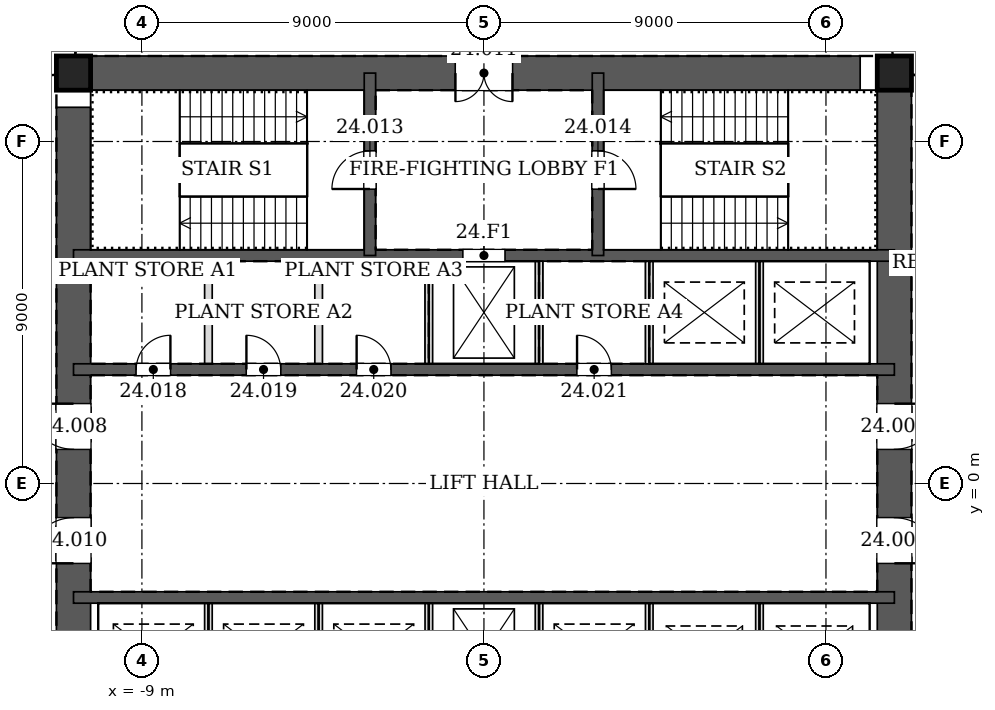
"""IFC4 building model, lengths in metres.
Left out: names, types, materials, properties, quantities, classifications, styles, units other than length and angle.
Written with IfcOpenShell. Run it as: python <this file> out.ifc"""

import sys

from ifc_helpers import new_model, si_unit, direction, frame, frame_2d, origin, origin_2d, place, context, subcontext, project, spatial, rectangle, hollow_rectangle, extrude, element, fill, save


model = new_model("IFC4")
c1 = context("Model", 3, precision=1e-05, world=origin(), true_north=direction((0.0, 1.0)))
c2 = subcontext(c1, "Body", "Model", "MODEL_VIEW")
j1 = project(units=[si_unit("LENGTHUNIT", "METRE"), si_unit("PLANEANGLEUNIT", "RADIAN")], contexts=[c1])
p1 = place(None, origin())
s1 = spatial("IfcSite", under=j1, at=p1, CompositionType="ELEMENT")
p2 = place(p1, origin())
s2 = spatial("IfcBuilding", under=s1, at=p2, CompositionType="ELEMENT")
p3 = place(p2, frame((0.0, 0.0, 108.9)))
s3 = spatial("IfcBuildingStorey", under=s2, at=p3, CompositionType="ELEMENT", Elevation=108.9)
for number, where, z_axis, x_axis in (
    (1, (10.8, 10.8, 0.0), (0.0, 0.0, 1.0), (1.0, 0.0, 0.0)),
    (2, (-10.8, 10.8, 0.0), (0.0, 0.0, 1.0), (1.0, 0.0, 0.0)),
):
    element("IfcColumn", number, at=place(p3, frame(where, z_axis=z_axis, x_axis=x_axis)), inside=s3, PredefinedType="COLUMN", context=c2, shape_type="SweptSolid", body=[
        extrude(hollow_rectangle(XDim=0.9, YDim=0.9, WallThickness=0.06, at=origin_2d()), origin(), (0.0, 0.0, 1.0), 4.5),
    ])
p4 = place(p3, frame((10.8, -10.8, 0.0), z_axis=(0.0, 0.0, 1.0), x_axis=(0.0, 1.0, 0.0)))
e3 = element("IfcWall", 3, at=p4, inside=s3, PredefinedType="SOLIDWALL", context=c2, shape_type="SweptSolid", body=[
    extrude(rectangle(XDim=21.6, YDim=0.9, at=frame_2d((10.8, 0.0))), origin(), (0.0, 0.0, 1.0), 4.5),
])
p5 = place(p4, frame((11.7, 0.0, 0.0)))
e4 = element("IfcOpeningElement", 4, at=p5, cuts=e3, PredefinedType="OPENING", context=c2, shape_type="SweptSolid", body=[
    extrude(rectangle(XDim=1.2, YDim=2.1, at=frame_2d((0.6, 1.05))), frame((0.0, 0.46, 0.0), z_axis=(0.0, -1.0, 0.0), x_axis=(1.0, 0.0, 0.0)), (0.0, 0.0, 1.0), 0.92),
])
p6 = place(p4, frame((8.7, 0.0, 0.0)))
e5 = element("IfcOpeningElement", 5, at=p6, cuts=e3, PredefinedType="OPENING", context=c2, shape_type="SweptSolid", body=[
    extrude(rectangle(XDim=1.2, YDim=2.1, at=frame_2d((0.6, 1.05))), frame((0.0, 0.46, 0.0), z_axis=(0.0, -1.0, 0.0), x_axis=(1.0, 0.0, 0.0)), (0.0, 0.0, 1.0), 0.92),
])
p7 = place(p3, frame((10.8, 10.8, 0.0), z_axis=(0.0, 0.0, 1.0), x_axis=(-1.0, 0.0, 0.0)))
e6 = element("IfcWall", 6, at=p7, inside=s3, PredefinedType="SOLIDWALL", context=c2, shape_type="SweptSolid", body=[
    extrude(rectangle(XDim=21.6, YDim=0.9, at=frame_2d((10.8, 0.0))), origin(), (0.0, 0.0, 1.0), 4.5),
])
p8 = place(p7, frame((10.05, 0.0, 0.0)))
e7 = element("IfcOpeningElement", 7, at=p8, cuts=e6, PredefinedType="OPENING", context=c2, shape_type="SweptSolid", body=[
    extrude(rectangle(XDim=1.5, YDim=2.1, at=frame_2d((0.75, 1.05))), frame((0.0, 0.46, 0.0), z_axis=(0.0, -1.0, 0.0), x_axis=(1.0, 0.0, 0.0)), (0.0, 0.0, 1.0), 0.92),
])
p9 = place(p3, frame((-10.8, 10.8, 0.0), z_axis=(0.0, 0.0, 1.0), x_axis=(0.0, -1.0, 0.0)))
e8 = element("IfcWall", 8, at=p9, inside=s3, PredefinedType="SOLIDWALL", context=c2, shape_type="SweptSolid", body=[
    extrude(rectangle(XDim=21.6, YDim=0.9, at=frame_2d((10.8, 0.0))), origin(), (0.0, 0.0, 1.0), 4.5),
])
p10 = place(p9, frame((8.7, 0.0, 0.0)))
e9 = element("IfcOpeningElement", 9, at=p10, cuts=e8, PredefinedType="OPENING", context=c2, shape_type="SweptSolid", body=[
    extrude(rectangle(XDim=1.2, YDim=2.1, at=frame_2d((0.6, 1.05))), frame((0.0, 0.46, 0.0), z_axis=(0.0, -1.0, 0.0), x_axis=(1.0, 0.0, 0.0)), (0.0, 0.0, 1.0), 0.92),
])
p11 = place(p9, frame((11.7, 0.0, 0.0)))
e10 = element("IfcOpeningElement", 10, at=p11, cuts=e8, PredefinedType="OPENING", context=c2, shape_type="SweptSolid", body=[
    extrude(rectangle(XDim=1.2, YDim=2.1, at=frame_2d((0.6, 1.05))), frame((0.0, 0.46, 0.0), z_axis=(0.0, -1.0, 0.0), x_axis=(1.0, 0.0, 0.0)), (0.0, 0.0, 1.0), 0.92),
])
p12 = place(p3, frame((-10.8, 3.0, 0.0), z_axis=(0.0, 0.0, 1.0), x_axis=(1.0, 0.0, 0.0)))
e11 = element("IfcWall", 11, at=p12, inside=s3, PredefinedType="SOLIDWALL", context=c2, shape_type="SweptSolid", body=[
    extrude(rectangle(XDim=21.6, YDim=0.3, at=frame_2d((10.8, 0.0))), origin(), (0.0, 0.0, 1.0), 4.5),
])
p13 = place(p12, frame((1.65, 0.0, 0.0)))
e12 = element("IfcOpeningElement", 12, at=p13, cuts=e11, PredefinedType="OPENING", context=c2, shape_type="SweptSolid", body=[
    extrude(rectangle(XDim=0.9, YDim=2.1, at=frame_2d((0.45, 1.05))), frame((0.0, 0.16, 0.0), z_axis=(0.0, -1.0, 0.0), x_axis=(1.0, 0.0, 0.0)), (0.0, 0.0, 1.0), 0.32),
])
p14 = place(p12, frame((4.55, 0.0, 0.0)))
e13 = element("IfcOpeningElement", 13, at=p14, cuts=e11, PredefinedType="OPENING", context=c2, shape_type="SweptSolid", body=[
    extrude(rectangle(XDim=0.9, YDim=2.1, at=frame_2d((0.45, 1.05))), frame((0.0, 0.16, 0.0), z_axis=(0.0, -1.0, 0.0), x_axis=(1.0, 0.0, 0.0)), (0.0, 0.0, 1.0), 0.32),
])
p15 = place(p12, frame((7.45, 0.0, 0.0)))
e14 = element("IfcOpeningElement", 14, at=p15, cuts=e11, PredefinedType="OPENING", context=c2, shape_type="SweptSolid", body=[
    extrude(rectangle(XDim=0.9, YDim=2.1, at=frame_2d((0.45, 1.05))), frame((0.0, 0.16, 0.0), z_axis=(0.0, -1.0, 0.0), x_axis=(1.0, 0.0, 0.0)), (0.0, 0.0, 1.0), 0.32),
])
p16 = place(p12, frame((13.25, 0.0, 0.0)))
e15 = element("IfcOpeningElement", 15, at=p16, cuts=e11, PredefinedType="OPENING", context=c2, shape_type="SweptSolid", body=[
    extrude(rectangle(XDim=0.9, YDim=2.1, at=frame_2d((0.45, 1.05))), frame((0.0, 0.16, 0.0), z_axis=(0.0, -1.0, 0.0), x_axis=(1.0, 0.0, 0.0)), (0.0, 0.0, 1.0), 0.32),
])
p17 = place(p3, frame((-10.8, 6.0, 0.0), z_axis=(0.0, 0.0, 1.0), x_axis=(1.0, 0.0, 0.0)))
e16 = element("IfcWall", 16, at=p17, inside=s3, PredefinedType="SOLIDWALL", context=c2, shape_type="SweptSolid", body=[
    extrude(rectangle(XDim=21.6, YDim=0.3, at=frame_2d((10.8, 0.0))), origin(), (0.0, 0.0, 1.0), 4.5),
])
p18 = place(p17, frame((10.25, 0.0, 0.0)))
e17 = element("IfcOpeningElement", 17, at=p18, cuts=e16, PredefinedType="OPENING", context=c2, shape_type="SweptSolid", body=[
    extrude(rectangle(XDim=1.1, YDim=2.1, at=frame_2d((0.55, 1.05))), frame((0.0, 0.16, 0.0), z_axis=(0.0, -1.0, 0.0), x_axis=(1.0, 0.0, 0.0)), (0.0, 0.0, 1.0), 0.32),
])
p19 = place(p3, frame((-3.0, 6.0, 0.0), z_axis=(0.0, 0.0, 1.0), x_axis=(0.0, 1.0, 0.0)))
e18 = element("IfcWall", 18, at=p19, inside=s3, PredefinedType="SOLIDWALL", context=c2, shape_type="SweptSolid", body=[
    extrude(rectangle(XDim=4.8, YDim=0.3, at=frame_2d((2.4, 0.0))), origin(), (0.0, 0.0, 1.0), 4.5),
])
p20 = place(p19, frame((1.75, 0.0, 0.0)))
e19 = element("IfcOpeningElement", 19, at=p20, cuts=e18, PredefinedType="OPENING", context=c2, shape_type="SweptSolid", body=[
    extrude(rectangle(XDim=1.0, YDim=2.1, at=frame_2d((0.5, 1.05))), frame((0.0, 0.16, 0.0), z_axis=(0.0, -1.0, 0.0), x_axis=(1.0, 0.0, 0.0)), (0.0, 0.0, 1.0), 0.32),
])
p21 = place(p3, frame((3.0, 6.0, 0.0), z_axis=(0.0, 0.0, 1.0), x_axis=(0.0, 1.0, 0.0)))
e20 = element("IfcWall", 20, at=p21, inside=s3, PredefinedType="SOLIDWALL", context=c2, shape_type="SweptSolid", body=[
    extrude(rectangle(XDim=4.8, YDim=0.3, at=frame_2d((2.4, 0.0))), origin(), (0.0, 0.0, 1.0), 4.5),
])
p22 = place(p21, frame((1.75, 0.0, 0.0)))
e21 = element("IfcOpeningElement", 21, at=p22, cuts=e20, PredefinedType="OPENING", context=c2, shape_type="SweptSolid", body=[
    extrude(rectangle(XDim=1.0, YDim=2.1, at=frame_2d((0.5, 1.05))), frame((0.0, 0.16, 0.0), z_axis=(0.0, -1.0, 0.0), x_axis=(1.0, 0.0, 0.0)), (0.0, 0.0, 1.0), 0.32),
])
p23 = place(p3, frame((-10.8, -3.0, 0.0), z_axis=(0.0, 0.0, 1.0), x_axis=(1.0, 0.0, 0.0)))
e22 = element("IfcWall", 22, at=p23, inside=s3, PredefinedType="SOLIDWALL", context=c2, shape_type="SweptSolid", body=[
    extrude(rectangle(XDim=21.6, YDim=0.3, at=frame_2d((10.8, 0.0))), origin(), (0.0, 0.0, 1.0), 4.5),
])
for number, where, z_axis, x_axis in (
    (23, (-7.25, 3.15, 0.0), (0.0, 0.0, 1.0), (0.0, 1.0, 0.0)),
    (24, (-4.35, 3.15, 0.0), (0.0, 0.0, 1.0), (0.0, 1.0, 0.0)),
    (25, (-1.45, 3.15, 0.0), (0.0, 0.0, 1.0), (0.0, 1.0, 0.0)),
    (26, (1.45, 3.15, 0.0), (0.0, 0.0, 1.0), (0.0, 1.0, 0.0)),
    (27, (4.35, 3.15, 0.0), (0.0, 0.0, 1.0), (0.0, 1.0, 0.0)),
):
    element("IfcWall", number, at=place(p3, frame(where, z_axis=z_axis, x_axis=x_axis)), inside=s3, PredefinedType="PARTITIONING", context=c2, shape_type="SweptSolid", body=[
        extrude(rectangle(XDim=2.7, YDim=0.2, at=frame_2d((1.35, 0.0))), origin(), (0.0, 0.0, 1.0), 4.335),
    ])
for number, where, z_axis, x_axis in (
    (28, (7.25, 3.15, 0.0), (0.0, 0.0, 1.0), (0.0, 1.0, 0.0)),
    (29, (-7.25, -5.85, 0.0), (0.0, 0.0, 1.0), (0.0, 1.0, 0.0)),
    (30, (-4.35, -5.85, 0.0), (0.0, 0.0, 1.0), (0.0, 1.0, 0.0)),
    (31, (-1.45, -5.85, 0.0), (0.0, 0.0, 1.0), (0.0, 1.0, 0.0)),
    (32, (1.45, -5.85, 0.0), (0.0, 0.0, 1.0), (0.0, 1.0, 0.0)),
    (33, (4.35, -5.85, 0.0), (0.0, 0.0, 1.0), (0.0, 1.0, 0.0)),
    (34, (7.25, -5.85, 0.0), (0.0, 0.0, 1.0), (0.0, 1.0, 0.0)),
):
    element("IfcWall", number, at=place(p3, frame(where, z_axis=z_axis, x_axis=x_axis)), inside=s3, PredefinedType="PARTITIONING", context=c2, shape_type="SweptSolid", body=[
        extrude(rectangle(XDim=2.7, YDim=0.2, at=frame_2d((1.35, 0.0))), origin(), (0.0, 0.0, 1.0), 4.5),
    ])
p24 = place(p5, frame((1.2, 0.0, 0.0), z_axis=(0.0, 0.0, 1.0), x_axis=(-1.0, 0.0, 0.0)))
e35 = element("IfcDoor", 35, at=p24, inside=s3, OperationType="SINGLE_SWING_LEFT", PredefinedType="DOOR", context=c2, shape_type="SweptSolid", body=[
    extrude(rectangle(XDim=1.2, YDim=2.1, at=frame_2d((0.6, 1.05))), frame((0.0, 0.025, 0.0), z_axis=(0.0, -1.0, 0.0), x_axis=(1.0, 0.0, 0.0)), (0.0, 0.0, 1.0), 0.05),
])
fill(e4, e35)
p25 = place(p10, frame((1.2, 0.0, 0.0), z_axis=(0.0, 0.0, 1.0), x_axis=(-1.0, 0.0, 0.0)))
e36 = element("IfcDoor", 36, at=p25, inside=s3, OperationType="SINGLE_SWING_RIGHT", PredefinedType="DOOR", context=c2, shape_type="SweptSolid", body=[
    extrude(rectangle(XDim=1.2, YDim=2.1, at=frame_2d((0.6, 1.05))), frame((0.0, 0.025, 0.0), z_axis=(0.0, -1.0, 0.0), x_axis=(1.0, 0.0, 0.0)), (0.0, 0.0, 1.0), 0.05),
])
fill(e9, e36)
p26 = place(p6, frame((1.2, 0.0, 0.0), z_axis=(0.0, 0.0, 1.0), x_axis=(-1.0, 0.0, 0.0)))
e37 = element("IfcDoor", 37, at=p26, inside=s3, OperationType="SINGLE_SWING_RIGHT", PredefinedType="DOOR", context=c2, shape_type="SweptSolid", body=[
    extrude(rectangle(XDim=1.2, YDim=2.1, at=frame_2d((0.6, 1.05))), frame((0.0, 0.025, 0.0), z_axis=(0.0, -1.0, 0.0), x_axis=(1.0, 0.0, 0.0)), (0.0, 0.0, 1.0), 0.05),
])
fill(e5, e37)
p27 = place(p11, frame((1.2, 0.0, 0.0), z_axis=(0.0, 0.0, 1.0), x_axis=(-1.0, 0.0, 0.0)))
e38 = element("IfcDoor", 38, at=p27, inside=s3, OperationType="SINGLE_SWING_LEFT", PredefinedType="DOOR", context=c2, shape_type="SweptSolid", body=[
    extrude(rectangle(XDim=1.2, YDim=2.1, at=frame_2d((0.6, 1.05))), frame((0.0, 0.025, 0.0), z_axis=(0.0, -1.0, 0.0), x_axis=(1.0, 0.0, 0.0)), (0.0, 0.0, 1.0), 0.05),
])
fill(e10, e38)
p28 = place(p8, origin())
e39 = element("IfcDoor", 39, at=p28, inside=s3, OperationType="DOUBLE_DOOR_SINGLE_SWING", PredefinedType="DOOR", context=c2, shape_type="SweptSolid", body=[
    extrude(rectangle(XDim=1.5, YDim=2.1, at=frame_2d((0.75, 1.05))), frame((0.0, 0.025, 0.0), z_axis=(0.0, -1.0, 0.0), x_axis=(1.0, 0.0, 0.0)), (0.0, 0.0, 1.0), 0.05),
])
fill(e7, e39)
p29 = place(p20, origin())
e40 = element("IfcDoor", 40, at=p29, inside=s3, OperationType="SINGLE_SWING_LEFT", PredefinedType="DOOR", context=c2, shape_type="SweptSolid", body=[
    extrude(rectangle(XDim=1.0, YDim=2.1, at=frame_2d((0.5, 1.05))), frame((0.0, 0.025, 0.0), z_axis=(0.0, -1.0, 0.0), x_axis=(1.0, 0.0, 0.0)), (0.0, 0.0, 1.0), 0.05),
])
fill(e19, e40)
p30 = place(p22, frame((1.0, 0.0, 0.0), z_axis=(0.0, 0.0, 1.0), x_axis=(-1.0, 0.0, 0.0)))
e41 = element("IfcDoor", 41, at=p30, inside=s3, OperationType="SINGLE_SWING_RIGHT", PredefinedType="DOOR", context=c2, shape_type="SweptSolid", body=[
    extrude(rectangle(XDim=1.0, YDim=2.1, at=frame_2d((0.5, 1.05))), frame((0.0, 0.025, 0.0), z_axis=(0.0, -1.0, 0.0), x_axis=(1.0, 0.0, 0.0)), (0.0, 0.0, 1.0), 0.05),
])
fill(e21, e41)
p31 = place(p13, origin())
e42 = element("IfcDoor", 42, at=p31, inside=s3, OperationType="SINGLE_SWING_RIGHT", PredefinedType="DOOR", context=c2, shape_type="SweptSolid", body=[
    extrude(rectangle(XDim=0.9, YDim=2.1, at=frame_2d((0.45, 1.05))), frame((0.0, 0.025, 0.0), z_axis=(0.0, -1.0, 0.0), x_axis=(1.0, 0.0, 0.0)), (0.0, 0.0, 1.0), 0.05),
])
fill(e12, e42)
p32 = place(p14, origin())
e43 = element("IfcDoor", 43, at=p32, inside=s3, OperationType="SINGLE_SWING_LEFT", PredefinedType="DOOR", context=c2, shape_type="SweptSolid", body=[
    extrude(rectangle(XDim=0.9, YDim=2.1, at=frame_2d((0.45, 1.05))), frame((0.0, 0.025, 0.0), z_axis=(0.0, -1.0, 0.0), x_axis=(1.0, 0.0, 0.0)), (0.0, 0.0, 1.0), 0.05),
])
fill(e13, e43)
p33 = place(p15, origin())
e44 = element("IfcDoor", 44, at=p33, inside=s3, OperationType="SINGLE_SWING_LEFT", PredefinedType="DOOR", context=c2, shape_type="SweptSolid", body=[
    extrude(rectangle(XDim=0.9, YDim=2.1, at=frame_2d((0.45, 1.05))), frame((0.0, 0.025, 0.0), z_axis=(0.0, -1.0, 0.0), x_axis=(1.0, 0.0, 0.0)), (0.0, 0.0, 1.0), 0.05),
])
fill(e14, e44)
p34 = place(p16, origin())
e45 = element("IfcDoor", 45, at=p34, inside=s3, OperationType="SINGLE_SWING_LEFT", PredefinedType="DOOR", context=c2, shape_type="SweptSolid", body=[
    extrude(rectangle(XDim=0.9, YDim=2.1, at=frame_2d((0.45, 1.05))), frame((0.0, 0.025, 0.0), z_axis=(0.0, -1.0, 0.0), x_axis=(1.0, 0.0, 0.0)), (0.0, 0.0, 1.0), 0.05),
])
fill(e15, e45)
p35 = place(p18, origin())
e46 = element("IfcDoor", 46, at=p35, inside=s3, OperationType="DOUBLE_DOOR_SLIDING", PredefinedType="DOOR", context=c2, shape_type="SweptSolid", body=[
    extrude(rectangle(XDim=1.1, YDim=2.1, at=frame_2d((0.55, 1.05))), frame((0.0, 0.025, 0.0), z_axis=(0.0, -1.0, 0.0), x_axis=(1.0, 0.0, 0.0)), (0.0, 0.0, 1.0), 0.05),
])
fill(e17, e46)
save(model, sys.argv[1])
